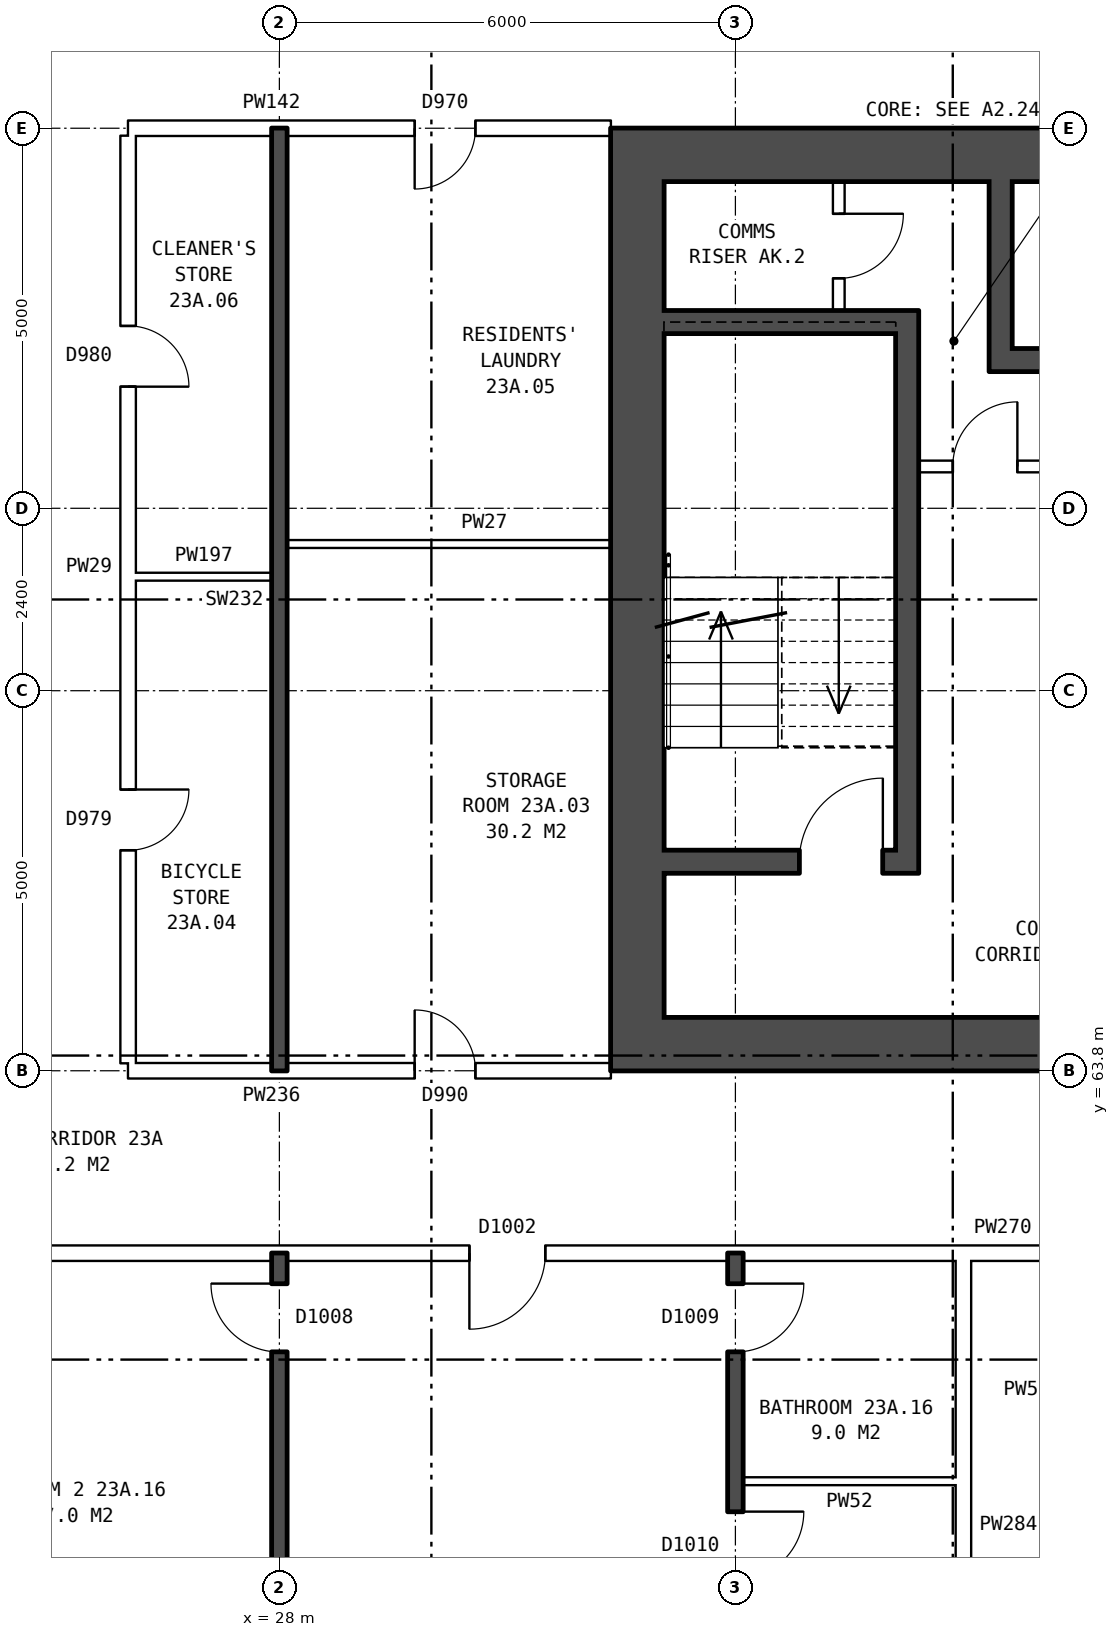
"""IFC4 building model, lengths in metres.
Left out: names, types, materials, properties, quantities, classifications, styles, units other than length and angle.
Written with IfcOpenShell. Run it as: python <this file> out.ifc"""

import sys

from ifc_helpers import new_model, si_unit, direction, frame, frame_2d, origin, place, context, subcontext, project, spatial, rectangle, extrude, element, fill, save


model = new_model("IFC4")
c1 = context("Model", 3, precision=1e-05, world=origin(), true_north=direction((0.0, 1.0)))
c2 = subcontext(c1, "Body", "Model", "MODEL_VIEW")
j1 = project(units=[si_unit("LENGTHUNIT", "METRE"), si_unit("PLANEANGLEUNIT", "RADIAN")], contexts=[c1])
p1 = place(None, origin())
s1 = spatial("IfcSite", under=j1, at=p1, CompositionType="ELEMENT")
p2 = place(p1, origin())
s2 = spatial("IfcBuilding", under=s1, at=p2, CompositionType="ELEMENT")
p3 = place(p2, frame((0.0, 0.0, 84.0)))
s3 = spatial("IfcBuildingStorey", under=s2, at=p3, CompositionType="ELEMENT", Elevation=84.0)
p4 = place(p3, frame((32.71, 75.5, 0.0), z_axis=(0.0, 0.0, 1.0), x_axis=(0.0, -1.0, 0.0)))
e1 = element("IfcWall", 1, at=p4, inside=s3, PredefinedType="SHEAR", context=c2, shape_type="SweptSolid", body=[
    extrude(rectangle(XDim=11.0, YDim=0.7, at=frame_2d((5.5, 0.0))), origin(), (0.0, 0.0, 1.0), 2.85),
])
for number, where, z_axis, x_axis in (
    (2, (41.36, 75.85, 0.0), (0.0, 0.0, 1.0), (-1.0, 0.0, 0.0)),
    (3, (41.36, 64.15, 0.0), (0.0, 0.0, 1.0), (-1.0, 0.0, 0.0)),
):
    element("IfcWall", number, at=place(p3, frame(where, z_axis=z_axis, x_axis=x_axis)), inside=s3, PredefinedType="SHEAR", context=c2, shape_type="SweptSolid", body=[
        extrude(rectangle(XDim=9.0, YDim=0.7, at=frame_2d((4.5, 0.0))), origin(), (0.0, 0.0, 1.0), 2.85),
    ])
p5 = place(p3, frame((36.11, 73.65, 0.0), z_axis=(0.0, 0.0, 1.0), x_axis=(-1.0, 0.0, 0.0)))
e4 = element("IfcWall", 4, at=p5, inside=s3, PredefinedType="SHEAR", context=c2, shape_type="SweptSolid", body=[
    extrude(rectangle(XDim=3.05, YDim=0.3, at=frame_2d((1.525, 0.0))), origin(), (0.0, 0.0, 1.0), 2.85),
])
p6 = place(p3, frame((40.66, 73.15, 0.0), z_axis=(0.0, 0.0, 1.0), x_axis=(-1.0, 0.0, 0.0)))
e5 = element("IfcWall", 5, at=p6, inside=s3, PredefinedType="SHEAR", context=c2, shape_type="SweptSolid", body=[
    extrude(rectangle(XDim=3.32, YDim=0.3, at=frame_2d((1.66, 0.0))), origin(), (0.0, 0.0, 1.0), 2.85),
])
p7 = place(p3, frame((38.16, 71.75, 0.0), z_axis=(0.0, 0.0, 1.0), x_axis=(-1.0, 0.0, 0.0)))
e6 = element("IfcWall", 6, at=p7, inside=s3, PredefinedType="PARTITIONING", context=c2, shape_type="SweptSolid", body=[
    extrude(rectangle(XDim=1.75, YDim=0.15, at=frame_2d((0.875, 0.0))), origin(), (0.0, 0.0, 1.0), 2.85),
])
p8 = place(p7, frame((0.45, 0.0, 0.0)))
e7 = element("IfcOpeningElement", 7, at=p8, cuts=e6, PredefinedType="OPENING", context=c2, shape_type="SweptSolid", body=[
    extrude(rectangle(XDim=0.85, YDim=2.1, at=frame_2d((0.425, 1.05))), frame((0.0, 0.085, 0.0), z_axis=(0.0, -1.0, 0.0), x_axis=(1.0, 0.0, 0.0)), (0.0, 0.0, 1.0), 0.17),
])
p9 = place(p3, frame((36.11, 66.55, 0.0), z_axis=(0.0, 0.0, 1.0), x_axis=(-1.0, 0.0, 0.0)))
e8 = element("IfcWall", 8, at=p9, inside=s3, PredefinedType="SHEAR", context=c2, shape_type="SweptSolid", body=[
    extrude(rectangle(XDim=3.05, YDim=0.3, at=frame_2d((1.525, 0.0))), origin(), (0.0, 0.0, 1.0), 2.85),
])
p10 = place(p9, frame((0.17, 0.0, 0.0)))
e9 = element("IfcOpeningElement", 9, at=p10, cuts=e8, PredefinedType="OPENING", context=c2, shape_type="SweptSolid", body=[
    extrude(rectangle(XDim=1.1, YDim=2.1, at=frame_2d((0.55, 1.05))), frame((0.0, 0.16, 0.0), z_axis=(0.0, -1.0, 0.0), x_axis=(1.0, 0.0, 0.0)), (0.0, 0.0, 1.0), 0.32),
])
p11 = place(p3, frame((37.49, 75.5, 0.0), z_axis=(0.0, 0.0, 1.0), x_axis=(0.0, -1.0, 0.0)))
e10 = element("IfcWall", 10, at=p11, inside=s3, PredefinedType="SHEAR", context=c2, shape_type="SweptSolid", body=[
    extrude(rectangle(XDim=2.2, YDim=0.3, at=frame_2d((1.1, 0.0))), origin(), (0.0, 0.0, 1.0), 2.85),
])
p12 = place(p3, frame((36.26, 73.8, 0.0), z_axis=(0.0, 0.0, 1.0), x_axis=(0.0, -1.0, 0.0)))
e11 = element("IfcWall", 11, at=p12, inside=s3, PredefinedType="SHEAR", context=c2, shape_type="SweptSolid", body=[
    extrude(rectangle(XDim=7.4, YDim=0.3, at=frame_2d((3.7, 0.0))), origin(), (0.0, 0.0, 1.0), 2.85),
])
p13 = place(p3, frame((35.36, 75.5, 0.0), z_axis=(0.0, 0.0, 1.0), x_axis=(0.0, -1.0, 0.0)))
e12 = element("IfcWall", 12, at=p13, inside=s3, PredefinedType="PARTITIONING", context=c2, shape_type="SweptSolid", body=[
    extrude(rectangle(XDim=1.7, YDim=0.15, at=frame_2d((0.85, 0.0))), origin(), (0.0, 0.0, 1.0), 2.85),
])
p14 = place(p13, frame((0.425, 0.0, 0.0)))
e13 = element("IfcOpeningElement", 13, at=p14, cuts=e12, PredefinedType="OPENING", context=c2, shape_type="SweptSolid", body=[
    extrude(rectangle(XDim=0.85, YDim=2.1, at=frame_2d((0.425, 1.05))), frame((0.0, 0.085, 0.0), z_axis=(0.0, -1.0, 0.0), x_axis=(1.0, 0.0, 0.0)), (0.0, 0.0, 1.0), 0.17),
])
p15 = place(p3, frame((34.1, 58.4, 0.0), z_axis=(0.0, 0.0, 1.0), x_axis=(1.0, 0.0, 0.0)))
e14 = element("IfcWall", 14, at=p15, inside=s3, PredefinedType="PARTITIONING", context=c2, shape_type="SweptSolid", body=[
    extrude(rectangle(XDim=2.8, YDim=0.1, at=frame_2d((1.4, 0.0))), origin(), (0.0, 0.0, 1.0), 2.85),
])
p16 = place(p3, frame((23.61, 61.4, 0.0), z_axis=(0.0, 0.0, 1.0), x_axis=(1.0, 0.0, 0.0)))
e15 = element("IfcWall", 15, at=p16, inside=s3, PredefinedType="PARTITIONING", context=c2, shape_type="SweptSolid", body=[
    extrude(rectangle(XDim=22.29, YDim=0.2, at=frame_2d((11.145, 0.0))), origin(), (0.0, 0.0, 1.0), 2.85),
])
p17 = place(p16, frame((18.84, 0.0, 0.0)))
e16 = element("IfcOpeningElement", 16, at=p17, cuts=e15, PredefinedType="OPENING", context=c2, shape_type="SweptSolid", body=[
    extrude(rectangle(XDim=1.0, YDim=2.1, at=frame_2d((0.5, 1.05))), frame((0.0, 0.11, 0.0), z_axis=(0.0, -1.0, 0.0), x_axis=(1.0, 0.0, 0.0)), (0.0, 0.0, 1.0), 0.22),
])
p18 = place(p16, frame((6.89, 0.0, 0.0)))
e17 = element("IfcOpeningElement", 17, at=p18, cuts=e15, PredefinedType="OPENING", context=c2, shape_type="SweptSolid", body=[
    extrude(rectangle(XDim=1.0, YDim=2.1, at=frame_2d((0.5, 1.05))), frame((0.0, 0.11, 0.0), z_axis=(0.0, -1.0, 0.0), x_axis=(1.0, 0.0, 0.0)), (0.0, 0.0, 1.0), 0.22),
])
p19 = place(p3, frame((26.01, 63.8, 0.0), z_axis=(0.0, 0.0, 1.0), x_axis=(1.0, 0.0, 0.0)))
e18 = element("IfcWall", 18, at=p19, inside=s3, PredefinedType="PARTITIONING", context=c2, shape_type="SweptSolid", body=[
    extrude(rectangle(XDim=6.35, YDim=0.2, at=frame_2d((3.175, 0.0))), origin(), (0.0, 0.0, 1.0), 2.85),
])
p20 = place(p19, frame((3.77, 0.0, 0.0)))
e19 = element("IfcOpeningElement", 19, at=p20, cuts=e18, PredefinedType="OPENING", context=c2, shape_type="SweptSolid", body=[
    extrude(rectangle(XDim=0.8, YDim=2.1, at=frame_2d((0.4, 1.05))), frame((0.0, 0.11, 0.0), z_axis=(0.0, -1.0, 0.0), x_axis=(1.0, 0.0, 0.0)), (0.0, 0.0, 1.0), 0.22),
])
p21 = place(p3, frame((26.11, 70.3, 0.0), z_axis=(0.0, 0.0, 1.0), x_axis=(1.0, 0.0, 0.0)))
e20 = element("IfcWall", 20, at=p21, inside=s3, PredefinedType="PARTITIONING", context=c2, shape_type="SweptSolid", body=[
    extrude(rectangle(XDim=1.79, YDim=0.1, at=frame_2d((0.895, 0.0))), origin(), (0.0, 0.0, 1.0), 2.85),
])
p22 = place(p3, frame((28.1, 70.73, 0.0), z_axis=(0.0, 0.0, 1.0), x_axis=(1.0, 0.0, 0.0)))
e21 = element("IfcWall", 21, at=p22, inside=s3, PredefinedType="PARTITIONING", context=c2, shape_type="SweptSolid", body=[
    extrude(rectangle(XDim=4.26, YDim=0.1, at=frame_2d((2.13, 0.0))), origin(), (0.0, 0.0, 1.0), 2.85),
])
p23 = place(p3, frame((26.01, 76.2, 0.0), z_axis=(0.0, 0.0, 1.0), x_axis=(1.0, 0.0, 0.0)))
e22 = element("IfcWall", 22, at=p23, inside=s3, PredefinedType="PARTITIONING", context=c2, shape_type="SweptSolid", body=[
    extrude(rectangle(XDim=6.35, YDim=0.2, at=frame_2d((3.175, 0.0))), origin(), (0.0, 0.0, 1.0), 2.85),
])
p24 = place(p23, frame((3.77, 0.0, 0.0)))
e23 = element("IfcOpeningElement", 23, at=p24, cuts=e22, PredefinedType="OPENING", context=c2, shape_type="SweptSolid", body=[
    extrude(rectangle(XDim=0.8, YDim=2.1, at=frame_2d((0.4, 1.05))), frame((0.0, 0.11, 0.0), z_axis=(0.0, -1.0, 0.0), x_axis=(1.0, 0.0, 0.0)), (0.0, 0.0, 1.0), 0.22),
])
p25 = place(p3, frame((26.01, 63.9, 0.0), z_axis=(0.0, 0.0, 1.0), x_axis=(0.0, 1.0, 0.0)))
e24 = element("IfcWall", 24, at=p25, inside=s3, PredefinedType="PARTITIONING", context=c2, shape_type="SweptSolid", body=[
    extrude(rectangle(XDim=12.2, YDim=0.2, at=frame_2d((6.1, 0.0))), origin(), (0.0, 0.0, 1.0), 2.85),
])
p26 = place(p25, frame((2.8, 0.0, 0.0)))
e25 = element("IfcOpeningElement", 25, at=p26, cuts=e24, PredefinedType="OPENING", context=c2, shape_type="SweptSolid", body=[
    extrude(rectangle(XDim=0.8, YDim=2.1, at=frame_2d((0.4, 1.05))), frame((0.0, 0.11, 0.0), z_axis=(0.0, -1.0, 0.0), x_axis=(1.0, 0.0, 0.0)), (0.0, 0.0, 1.0), 0.22),
])
p27 = place(p25, frame((8.9, 0.0, 0.0)))
e26 = element("IfcOpeningElement", 26, at=p27, cuts=e24, PredefinedType="OPENING", context=c2, shape_type="SweptSolid", body=[
    extrude(rectangle(XDim=0.8, YDim=2.1, at=frame_2d((0.4, 1.05))), frame((0.0, 0.11, 0.0), z_axis=(0.0, -1.0, 0.0), x_axis=(1.0, 0.0, 0.0)), (0.0, 0.0, 1.0), 0.22),
])
p28 = place(p3, frame((28.0, 54.36, 0.0), z_axis=(0.0, 0.0, 1.0), x_axis=(0.0, 1.0, 0.0)))
e27 = element("IfcWall", 27, at=p28, inside=s3, PredefinedType="SOLIDWALL", context=c2, shape_type="SweptSolid", body=[
    extrude(rectangle(XDim=7.04, YDim=0.2, at=frame_2d((3.52, 0.0))), origin(), (0.0, 0.0, 1.0), 2.85),
])
p29 = place(p28, frame((5.74, 0.0, 0.0)))
e28 = element("IfcOpeningElement", 28, at=p29, cuts=e27, PredefinedType="OPENING", context=c2, shape_type="SweptSolid", body=[
    extrude(rectangle(XDim=0.9, YDim=2.1, at=frame_2d((0.45, 1.05))), frame((0.0, 0.11, 0.0), z_axis=(0.0, -1.0, 0.0), x_axis=(1.0, 0.0, 0.0)), (0.0, 0.0, 1.0), 0.22),
])
p30 = place(p3, frame((28.0, 63.8, 0.0), z_axis=(0.0, 0.0, 1.0), x_axis=(0.0, 1.0, 0.0)))
e29 = element("IfcWall", 29, at=p30, inside=s3, PredefinedType="SOLIDWALL", context=c2, shape_type="SweptSolid", body=[
    extrude(rectangle(XDim=12.4, YDim=0.2, at=frame_2d((6.2, 0.0))), origin(), (0.0, 0.0, 1.0), 2.85),
])
p31 = place(p3, frame((34.0, 54.36, 0.0), z_axis=(0.0, 0.0, 1.0), x_axis=(0.0, 1.0, 0.0)))
e30 = element("IfcWall", 30, at=p31, inside=s3, PredefinedType="SOLIDWALL", context=c2, shape_type="SweptSolid", body=[
    extrude(rectangle(XDim=7.04, YDim=0.2, at=frame_2d((3.52, 0.0))), origin(), (0.0, 0.0, 1.0), 2.85),
])
p32 = place(p31, frame((2.74, 0.0, 0.0)))
e31 = element("IfcOpeningElement", 31, at=p32, cuts=e30, PredefinedType="OPENING", context=c2, shape_type="SweptSolid", body=[
    extrude(rectangle(XDim=0.9, YDim=2.1, at=frame_2d((0.45, 1.05))), frame((0.0, 0.11, 0.0), z_axis=(0.0, -1.0, 0.0), x_axis=(1.0, 0.0, 0.0)), (0.0, 0.0, 1.0), 0.22),
])
p33 = place(p31, frame((5.74, 0.0, 0.0)))
e32 = element("IfcOpeningElement", 32, at=p33, cuts=e30, PredefinedType="OPENING", context=c2, shape_type="SweptSolid", body=[
    extrude(rectangle(XDim=0.9, YDim=2.1, at=frame_2d((0.45, 1.05))), frame((0.0, 0.11, 0.0), z_axis=(0.0, -1.0, 0.0), x_axis=(1.0, 0.0, 0.0)), (0.0, 0.0, 1.0), 0.22),
])
p34 = place(p3, frame((37.0, 54.36, 0.0), z_axis=(0.0, 0.0, 1.0), x_axis=(0.0, 1.0, 0.0)))
e33 = element("IfcWall", 33, at=p34, inside=s3, PredefinedType="PARTITIONING", context=c2, shape_type="SweptSolid", body=[
    extrude(rectangle(XDim=6.94, YDim=0.2, at=frame_2d((3.47, 0.0))), origin(), (0.0, 0.0, 1.0), 2.85),
])
p35 = place(p10, frame((1.1, 0.0, 0.0), z_axis=(0.0, 0.0, 1.0), x_axis=(-1.0, 0.0, 0.0)))
e34 = element("IfcDoor", 34, at=p35, inside=s3, OperationType="SINGLE_SWING_RIGHT", PredefinedType="DOOR", context=c2, shape_type="SweptSolid", body=[
    extrude(rectangle(XDim=1.1, YDim=2.1, at=frame_2d((0.55, 1.05))), frame((0.0, 0.025, 0.0), z_axis=(0.0, -1.0, 0.0), x_axis=(1.0, 0.0, 0.0)), (0.0, 0.0, 1.0), 0.05),
])
fill(e9, e34)
p36 = place(p8, frame((0.85, 0.0, 0.0), z_axis=(0.0, 0.0, 1.0), x_axis=(-1.0, 0.0, 0.0)))
e35 = element("IfcDoor", 35, at=p36, inside=s3, OperationType="SINGLE_SWING_RIGHT", PredefinedType="DOOR", context=c2, shape_type="SweptSolid", body=[
    extrude(rectangle(XDim=0.85, YDim=2.1, at=frame_2d((0.425, 1.05))), frame((0.0, 0.025, 0.0), z_axis=(0.0, -1.0, 0.0), x_axis=(1.0, 0.0, 0.0)), (0.0, 0.0, 1.0), 0.05),
])
fill(e7, e35)
p37 = place(p14, origin())
e36 = element("IfcDoor", 36, at=p37, inside=s3, OperationType="SINGLE_SWING_LEFT", PredefinedType="DOOR", context=c2, shape_type="SweptSolid", body=[
    extrude(rectangle(XDim=0.85, YDim=2.1, at=frame_2d((0.425, 1.05))), frame((0.0, 0.025, 0.0), z_axis=(0.0, -1.0, 0.0), x_axis=(1.0, 0.0, 0.0)), (0.0, 0.0, 1.0), 0.05),
])
fill(e13, e36)
p38 = place(p20, origin())
e37 = element("IfcDoor", 37, at=p38, inside=s3, OperationType="SINGLE_SWING_LEFT", PredefinedType="DOOR", context=c2, shape_type="SweptSolid", body=[
    extrude(rectangle(XDim=0.8, YDim=2.1, at=frame_2d((0.4, 1.05))), frame((0.0, 0.025, 0.0), z_axis=(0.0, -1.0, 0.0), x_axis=(1.0, 0.0, 0.0)), (0.0, 0.0, 1.0), 0.05),
])
fill(e19, e37)
p39 = place(p26, frame((0.8, 0.0, 0.0), z_axis=(0.0, 0.0, 1.0), x_axis=(-1.0, 0.0, 0.0)))
e38 = element("IfcDoor", 38, at=p39, inside=s3, OperationType="SINGLE_SWING_LEFT", PredefinedType="DOOR", context=c2, shape_type="SweptSolid", body=[
    extrude(rectangle(XDim=0.8, YDim=2.1, at=frame_2d((0.4, 1.05))), frame((0.0, 0.025, 0.0), z_axis=(0.0, -1.0, 0.0), x_axis=(1.0, 0.0, 0.0)), (0.0, 0.0, 1.0), 0.05),
])
fill(e25, e38)
p40 = place(p24, frame((0.8, 0.0, 0.0), z_axis=(0.0, 0.0, 1.0), x_axis=(-1.0, 0.0, 0.0)))
e39 = element("IfcDoor", 39, at=p40, inside=s3, OperationType="SINGLE_SWING_RIGHT", PredefinedType="DOOR", context=c2, shape_type="SweptSolid", body=[
    extrude(rectangle(XDim=0.8, YDim=2.1, at=frame_2d((0.4, 1.05))), frame((0.0, 0.025, 0.0), z_axis=(0.0, -1.0, 0.0), x_axis=(1.0, 0.0, 0.0)), (0.0, 0.0, 1.0), 0.05),
])
fill(e23, e39)
p41 = place(p27, frame((0.8, 0.0, 0.0), z_axis=(0.0, 0.0, 1.0), x_axis=(-1.0, 0.0, 0.0)))
e40 = element("IfcDoor", 40, at=p41, inside=s3, OperationType="SINGLE_SWING_RIGHT", PredefinedType="DOOR", context=c2, shape_type="SweptSolid", body=[
    extrude(rectangle(XDim=0.8, YDim=2.1, at=frame_2d((0.4, 1.05))), frame((0.0, 0.025, 0.0), z_axis=(0.0, -1.0, 0.0), x_axis=(1.0, 0.0, 0.0)), (0.0, 0.0, 1.0), 0.05),
])
fill(e26, e40)
p42 = place(p32, frame((0.9, 0.0, 0.0), z_axis=(0.0, 0.0, 1.0), x_axis=(-1.0, 0.0, 0.0)))
e41 = element("IfcDoor", 41, at=p42, inside=s3, OperationType="SINGLE_SWING_LEFT", PredefinedType="DOOR", context=c2, shape_type="SweptSolid", body=[
    extrude(rectangle(XDim=0.9, YDim=2.1, at=frame_2d((0.45, 1.05))), frame((0.0, 0.025, 0.0), z_axis=(0.0, -1.0, 0.0), x_axis=(1.0, 0.0, 0.0)), (0.0, 0.0, 1.0), 0.05),
])
fill(e31, e41)
p43 = place(p29, origin())
e42 = element("IfcDoor", 42, at=p43, inside=s3, OperationType="SINGLE_SWING_RIGHT", PredefinedType="DOOR", context=c2, shape_type="SweptSolid", body=[
    extrude(rectangle(XDim=0.9, YDim=2.1, at=frame_2d((0.45, 1.05))), frame((0.0, 0.025, 0.0), z_axis=(0.0, -1.0, 0.0), x_axis=(1.0, 0.0, 0.0)), (0.0, 0.0, 1.0), 0.05),
])
fill(e28, e42)
p44 = place(p18, frame((1.0, 0.0, 0.0), z_axis=(0.0, 0.0, 1.0), x_axis=(-1.0, 0.0, 0.0)))
e43 = element("IfcDoor", 43, at=p44, inside=s3, OperationType="SINGLE_SWING_RIGHT", PredefinedType="DOOR", context=c2, shape_type="SweptSolid", body=[
    extrude(rectangle(XDim=1.0, YDim=2.1, at=frame_2d((0.5, 1.05))), frame((0.0, 0.025, 0.0), z_axis=(0.0, -1.0, 0.0), x_axis=(1.0, 0.0, 0.0)), (0.0, 0.0, 1.0), 0.05),
])
fill(e17, e43)
p45 = place(p33, frame((0.9, 0.0, 0.0), z_axis=(0.0, 0.0, 1.0), x_axis=(-1.0, 0.0, 0.0)))
e44 = element("IfcDoor", 44, at=p45, inside=s3, OperationType="SINGLE_SWING_LEFT", PredefinedType="DOOR", context=c2, shape_type="SweptSolid", body=[
    extrude(rectangle(XDim=0.9, YDim=2.1, at=frame_2d((0.45, 1.05))), frame((0.0, 0.025, 0.0), z_axis=(0.0, -1.0, 0.0), x_axis=(1.0, 0.0, 0.0)), (0.0, 0.0, 1.0), 0.05),
])
fill(e32, e44)
save(model, sys.argv[1])
